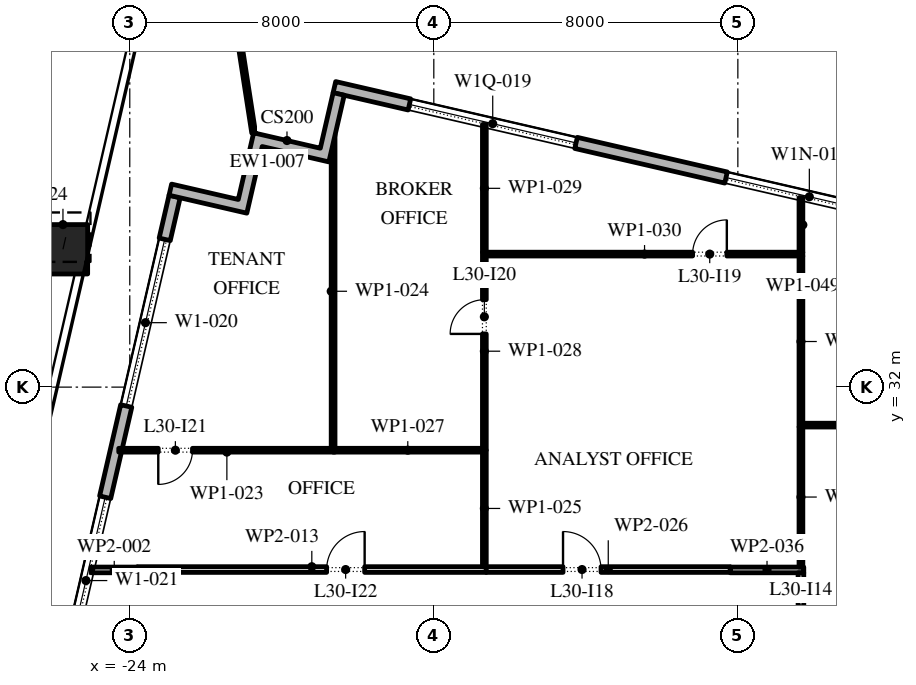
"""IFC4 building model, lengths in metres.
Left out: names, types, materials, properties, quantities, classifications, styles, units other than length and angle.
Written with IfcOpenShell. Run it as: python <this file> out.ifc"""

import sys

from ifc_helpers import new_model, si_unit, direction, frame, frame_2d, origin, origin_2d, place, context, subcontext, project, spatial, polyline, rectangle, outline, extrude, element, fill, save


model = new_model("IFC4")
c1 = context("Model", 3, precision=1e-05, world=origin(), true_north=direction((0.0, 1.0)))
c2 = subcontext(c1, "Body", "Model", "MODEL_VIEW")
j1 = project(units=[si_unit("LENGTHUNIT", "METRE"), si_unit("PLANEANGLEUNIT", "RADIAN")], contexts=[c1])
p1 = place(None, origin())
s1 = spatial("IfcSite", under=j1, at=p1, CompositionType="ELEMENT")
p2 = place(p1, origin())
s2 = spatial("IfcBuilding", under=s1, at=p2, CompositionType="ELEMENT")
p3 = place(p2, frame((0.0, 0.0, 139.2)))
s3 = spatial("IfcBuildingStorey", under=s2, at=p3, CompositionType="ELEMENT", Elevation=139.2)
p4 = place(p3, frame((-25.758, 35.626, 0.0), z_axis=(0.017444089556, 0.075687644385, 0.996978978829), x_axis=(-0.974454034257, 0.224587032398, 0.0)))
e1 = element("IfcColumn", 1, at=p4, inside=s3, PredefinedType="COLUMN", context=c2, shape_type="SweptSolid", body=[
    extrude(rectangle(XDim=1.3, YDim=1.3, at=origin_2d()), origin(), (0.0, 0.0, 1.0), 4.213),
])
p5 = place(p3, frame((31.078, 28.421, 0.0), z_axis=(0.0, 0.0, 1.0), x_axis=(-0.974370456532, 0.224949357493, 0.0)))
e2 = element("IfcWall", 2, at=p5, inside=s3, PredefinedType="STANDARD", context=c2, shape_type="SweptSolid", body=[
    extrude(rectangle(XDim=51.0, YDim=0.3, at=frame_2d((25.5, 0.0))), origin(), (0.0, 0.0, 1.0), 4.0),
])
p6 = place(p5, frame((1.875, 0.0, 0.45)))
e3 = element("IfcOpeningElement", 3, at=p6, cuts=e2, PredefinedType="OPENING", context=c2, shape_type="SweptSolid", body=[
    extrude(rectangle(XDim=4.5, YDim=2.875, at=frame_2d((2.25, 1.438))), frame((0.0, 0.16, 0.0), z_axis=(0.0, -1.0, 0.0), x_axis=(1.0, 0.0, 0.0)), (0.0, 0.0, 1.0), 0.32),
])
p7 = place(p5, frame((10.275, 0.0, 0.45)))
e4 = element("IfcOpeningElement", 4, at=p7, cuts=e2, PredefinedType="OPENING", context=c2, shape_type="SweptSolid", body=[
    extrude(rectangle(XDim=4.5, YDim=2.825, at=frame_2d((2.25, 1.413))), frame((0.0, 0.16, 0.0), z_axis=(0.0, -1.0, 0.0), x_axis=(1.0, 0.0, 0.0)), (0.0, 0.0, 1.0), 0.32),
])
p8 = place(p5, frame((18.825, 0.0, 0.45)))
e5 = element("IfcOpeningElement", 5, at=p8, cuts=e2, PredefinedType="OPENING", context=c2, shape_type="SweptSolid", body=[
    extrude(rectangle(XDim=4.5, YDim=2.75, at=frame_2d((2.25, 1.375))), frame((0.0, 0.16, 0.0), z_axis=(0.0, -1.0, 0.0), x_axis=(1.0, 0.0, 0.0)), (0.0, 0.0, 1.0), 0.32),
])
p9 = place(p5, frame((27.075, 0.0, 0.0)))
e6 = element("IfcOpeningElement", 6, at=p9, cuts=e2, PredefinedType="OPENING", context=c2, shape_type="SweptSolid", body=[
    extrude(rectangle(XDim=2.4, YDim=3.125, at=frame_2d((1.2, 1.562))), frame((0.0, 0.16, 0.0), z_axis=(0.0, -1.0, 0.0), x_axis=(1.0, 0.0, 0.0)), (0.0, 0.0, 1.0), 0.32),
])
p10 = place(p5, frame((35.925, 0.0, 0.45)))
e7 = element("IfcOpeningElement", 7, at=p10, cuts=e2, PredefinedType="OPENING", context=c2, shape_type="SweptSolid", body=[
    extrude(rectangle(XDim=4.5, YDim=2.525, at=frame_2d((2.25, 1.262))), frame((0.0, 0.16, 0.0), z_axis=(0.0, -1.0, 0.0), x_axis=(1.0, 0.0, 0.0)), (0.0, 0.0, 1.0), 0.32),
])
p11 = place(p5, frame((44.475, 0.0, 0.45)))
e8 = element("IfcOpeningElement", 8, at=p11, cuts=e2, PredefinedType="OPENING", context=c2, shape_type="SweptSolid", body=[
    extrude(rectangle(XDim=4.5, YDim=2.45, at=frame_2d((2.25, 1.225))), frame((0.0, 0.16, 0.0), z_axis=(0.0, -1.0, 0.0), x_axis=(1.0, 0.0, 0.0)), (0.0, 0.0, 1.0), 0.32),
])
p12 = place(p3, frame((-22.82, 37.016, 0.0), z_axis=(0.0, 0.0, 1.0), x_axis=(-0.224953880882, -0.974369412223, 0.0)))
e9 = element("IfcWall", 9, at=p12, inside=s3, PredefinedType="STANDARD", context=c2, shape_type="SweptSolid", body=[
    extrude(rectangle(XDim=49.5, YDim=0.3, at=frame_2d((24.75, 0.0))), origin(), (0.0, 0.0, 1.0), 4.0),
])
p13 = place(p12, frame((1.157, 0.0, 0.45)))
e10 = element("IfcOpeningElement", 10, at=p13, cuts=e9, PredefinedType="OPENING", context=c2, shape_type="SweptSolid", body=[
    extrude(rectangle(XDim=4.5, YDim=3.05, at=frame_2d((2.25, 1.525))), frame((0.0, 0.16, 0.0), z_axis=(0.0, -1.0, 0.0), x_axis=(1.0, 0.0, 0.0)), (0.0, 0.0, 1.0), 0.32),
])
p14 = place(p12, frame((8.121, 0.0, 0.45)))
e11 = element("IfcOpeningElement", 11, at=p14, cuts=e9, PredefinedType="OPENING", context=c2, shape_type="SweptSolid", body=[
    extrude(rectangle(XDim=4.5, YDim=3.05, at=frame_2d((2.25, 1.525))), frame((0.0, 0.16, 0.0), z_axis=(0.0, -1.0, 0.0), x_axis=(1.0, 0.0, 0.0)), (0.0, 0.0, 1.0), 0.32),
])
p15 = place(p12, frame((15.236, 0.0, 0.45)))
e12 = element("IfcOpeningElement", 12, at=p15, cuts=e9, PredefinedType="OPENING", context=c2, shape_type="SweptSolid", body=[
    extrude(rectangle(XDim=4.5, YDim=3.05, at=frame_2d((2.25, 1.525))), frame((0.0, 0.16, 0.0), z_axis=(0.0, -1.0, 0.0), x_axis=(1.0, 0.0, 0.0)), (0.0, 0.0, 1.0), 0.32),
])
p16 = place(p12, frame((23.4, 0.0, 0.0)))
e13 = element("IfcOpeningElement", 13, at=p16, cuts=e9, PredefinedType="OPENING", context=c2, shape_type="SweptSolid", body=[
    extrude(rectangle(XDim=2.4, YDim=3.5, at=frame_2d((1.2, 1.75))), frame((0.0, 0.16, 0.0), z_axis=(0.0, -1.0, 0.0), x_axis=(1.0, 0.0, 0.0)), (0.0, 0.0, 1.0), 0.32),
])
p17 = place(p12, frame((29.464, 0.0, 0.45)))
e14 = element("IfcOpeningElement", 14, at=p17, cuts=e9, PredefinedType="OPENING", context=c2, shape_type="SweptSolid", body=[
    extrude(rectangle(XDim=4.5, YDim=2.875, at=frame_2d((2.25, 1.438))), frame((0.0, 0.16, 0.0), z_axis=(0.0, -1.0, 0.0), x_axis=(1.0, 0.0, 0.0)), (0.0, 0.0, 1.0), 0.32),
])
p18 = place(p12, frame((36.579, 0.0, 0.45)))
e15 = element("IfcOpeningElement", 15, at=p18, cuts=e9, PredefinedType="OPENING", context=c2, shape_type="SweptSolid", body=[
    extrude(rectangle(XDim=4.5, YDim=2.675, at=frame_2d((2.25, 1.337))), frame((0.0, 0.16, 0.0), z_axis=(0.0, -1.0, 0.0), x_axis=(1.0, 0.0, 0.0)), (0.0, 0.0, 1.0), 0.32),
])
p19 = place(p12, frame((43.693, 0.0, 0.45)))
e16 = element("IfcOpeningElement", 16, at=p19, cuts=e9, PredefinedType="OPENING", context=c2, shape_type="SweptSolid", body=[
    extrude(rectangle(XDim=4.5, YDim=3.05, at=frame_2d((2.25, 1.525))), frame((0.0, 0.16, 0.0), z_axis=(0.0, -1.0, 0.0), x_axis=(1.0, 0.0, 0.0)), (0.0, 0.0, 1.0), 0.32),
])
p20 = place(p3, origin())
e17 = element("IfcWall", 17, at=p20, inside=s3, PredefinedType="STANDARD", context=c2, shape_type="SweptSolid", body=[
    extrude(outline(polyline([(-22.967, 37.049), (-22.899, 37.342), (-21.145, 36.937), (-20.74, 38.691), (-18.986, 38.286), (-18.649, 39.747), (-18.357, 39.68), (-18.762, 37.926), (-20.515, 38.331), (-20.92, 36.577), (-22.967, 37.049)])), origin(), (0.0, 0.0, 1.0), 4.0),
])
p21 = place(p3, frame((-20.74, 38.691, -0.05), z_axis=(0.0, 0.0, 1.0), x_axis=(-0.153017511603, 0.988223477328, 0.0)))
e18 = element("IfcWall", 18, at=p21, inside=s3, PredefinedType="STANDARD", context=c2, shape_type="SweptSolid", body=[
    extrude(rectangle(XDim=4.871, YDim=0.1, at=frame_2d((2.436, 0.0))), origin(), (0.0, 0.0, 1.0), 4.05),
])
p22 = place(p3, frame((-25.017, 27.19, 0.0), z_axis=(0.0, 0.0, 1.0), x_axis=(1.0, 0.0, 0.0)))
e19 = element("IfcWall", 19, at=p22, inside=s3, PredefinedType="PARTITIONING", context=c2, shape_type="SweptSolid", body=[
    extrude(rectangle(XDim=1.217, YDim=0.15, at=frame_2d((0.608, 0.0))), origin(), (0.0, 0.0, 1.0), 4.0),
])
p23 = place(p3, frame((-23.8, 27.2, 0.0), z_axis=(0.0, 0.0, 1.0), x_axis=(1.0, 0.0, 0.0)))
e20 = element("IfcWall", 20, at=p23, inside=s3, PredefinedType="PARTITIONING", context=c2, shape_type="SweptSolid", body=[
    extrude(rectangle(XDim=9.18, YDim=0.15, at=frame_2d((4.59, 0.0))), origin(), (0.0, 0.0, 1.0), 4.0),
])
p24 = place(p23, frame((4.98, 0.0, 0.0)))
e21 = element("IfcOpeningElement", 21, at=p24, cuts=e20, PredefinedType="OPENING", context=c2, shape_type="SweptSolid", body=[
    extrude(rectangle(XDim=1.0, YDim=2.1, at=frame_2d((0.5, 1.05))), frame((0.0, 0.085, 0.0), z_axis=(0.0, -1.0, 0.0), x_axis=(1.0, 0.0, 0.0)), (0.0, 0.0, 1.0), 0.17),
])
p25 = place(p3, frame((-18.6, 30.34, 0.0), z_axis=(0.0, 0.0, 1.0), x_axis=(-1.0, 0.0, 0.0)))
e22 = element("IfcWall", 22, at=p25, inside=s3, PredefinedType="PARTITIONING", context=c2, shape_type="SweptSolid", body=[
    extrude(rectangle(XDim=5.69, YDim=0.1, at=frame_2d((2.845, 0.0))), origin(), (0.0, 0.0, 1.0), 4.0),
])
p26 = place(p25, frame((3.75, 0.0, 0.0)))
e23 = element("IfcOpeningElement", 23, at=p26, cuts=e22, PredefinedType="OPENING", context=c2, shape_type="SweptSolid", body=[
    extrude(rectangle(XDim=0.9, YDim=2.1, at=frame_2d((0.45, 1.05))), frame((0.0, 0.06, 0.0), z_axis=(0.0, -1.0, 0.0), x_axis=(1.0, 0.0, 0.0)), (0.0, 0.0, 1.0), 0.12),
])
p27 = place(p3, frame((-18.65, 30.39, 0.0), z_axis=(0.0, 0.0, 1.0), x_axis=(0.0, 1.0, 0.0)))
e24 = element("IfcWall", 24, at=p27, inside=s3, PredefinedType="PARTITIONING", context=c2, shape_type="SweptSolid", body=[
    extrude(rectangle(XDim=8.264, YDim=0.1, at=frame_2d((4.132, 0.0))), origin(), (0.0, 0.0, 1.0), 4.0),
])
p28 = place(p3, frame((-14.67, 27.275, 0.0), z_axis=(0.0, 0.0, 1.0), x_axis=(0.0, 1.0, 0.0)))
e25 = element("IfcWall", 25, at=p28, inside=s3, PredefinedType="PARTITIONING", context=c2, shape_type="SweptSolid", body=[
    extrude(rectangle(XDim=3.065, YDim=0.1, at=frame_2d((1.533, 0.0))), origin(), (0.0, 0.0, 1.0), 4.0),
])
p29 = place(p3, frame((-14.62, 27.2, 0.0), z_axis=(0.0, 0.0, 1.0), x_axis=(1.0, 0.0, 0.0)))
e26 = element("IfcWall", 26, at=p29, inside=s3, PredefinedType="PARTITIONING", context=c2, shape_type="SweptSolid", body=[
    extrude(rectangle(XDim=6.42, YDim=0.15, at=frame_2d((3.21, 0.0))), origin(), (0.0, 0.0, 1.0), 4.0),
])
p30 = place(p29, frame((2.02, 0.0, 0.0)))
e27 = element("IfcOpeningElement", 27, at=p30, cuts=e26, PredefinedType="OPENING", context=c2, shape_type="SweptSolid", body=[
    extrude(rectangle(XDim=1.0, YDim=2.1, at=frame_2d((0.5, 1.05))), frame((0.0, 0.085, 0.0), z_axis=(0.0, -1.0, 0.0), x_axis=(1.0, 0.0, 0.0)), (0.0, 0.0, 1.0), 0.17),
])
p31 = place(p3, frame((-14.72, 30.34, 0.0), z_axis=(0.0, 0.0, 1.0), x_axis=(-1.0, 0.0, 0.0)))
e28 = element("IfcWall", 28, at=p31, inside=s3, PredefinedType="PARTITIONING", context=c2, shape_type="SweptSolid", body=[
    extrude(rectangle(XDim=3.93, YDim=0.1, at=frame_2d((1.965, 0.0))), origin(), (0.0, 0.0, 1.0), 4.0),
])
p32 = place(p3, frame((-14.67, 30.34, 0.0), z_axis=(0.0, 0.0, 1.0), x_axis=(0.0, 1.0, 0.0)))
e29 = element("IfcWall", 29, at=p32, inside=s3, PredefinedType="PARTITIONING", context=c2, shape_type="SweptSolid", body=[
    extrude(rectangle(XDim=5.21, YDim=0.1, at=frame_2d((2.605, 0.0))), origin(), (0.0, 0.0, 1.0), 4.0),
])
p33 = place(p32, frame((3.06, 0.0, 0.0)))
e30 = element("IfcOpeningElement", 30, at=p33, cuts=e29, PredefinedType="OPENING", context=c2, shape_type="SweptSolid", body=[
    extrude(rectangle(XDim=0.9, YDim=2.1, at=frame_2d((0.45, 1.05))), frame((0.0, 0.06, 0.0), z_axis=(0.0, -1.0, 0.0), x_axis=(1.0, 0.0, 0.0)), (0.0, 0.0, 1.0), 0.12),
])
p34 = place(p3, frame((-14.67, 35.55, 0.0), z_axis=(0.0, 0.0, 1.0), x_axis=(0.0, 1.0, 0.0)))
e31 = element("IfcWall", 31, at=p34, inside=s3, PredefinedType="PARTITIONING", context=c2, shape_type="SweptSolid", body=[
    extrude(rectangle(XDim=3.361, YDim=0.1, at=frame_2d((1.68, 0.0))), origin(), (0.0, 0.0, 1.0), 4.0),
])
p35 = place(p3, frame((-14.62, 35.5, 0.0), z_axis=(0.0, 0.0, 1.0), x_axis=(1.0, 0.0, 0.0)))
e32 = element("IfcWall", 32, at=p35, inside=s3, PredefinedType="PARTITIONING", context=c2, shape_type="SweptSolid", body=[
    extrude(rectangle(XDim=8.33, YDim=0.1, at=frame_2d((4.165, 0.0))), origin(), (0.0, 0.0, 1.0), 4.0),
])
p36 = place(p35, frame((5.43, 0.0, 0.0)))
e33 = element("IfcOpeningElement", 33, at=p36, cuts=e32, PredefinedType="OPENING", context=c2, shape_type="SweptSolid", body=[
    extrude(rectangle(XDim=0.9, YDim=2.1, at=frame_2d((0.45, 1.05))), frame((0.0, 0.06, 0.0), z_axis=(0.0, -1.0, 0.0), x_axis=(1.0, 0.0, 0.0)), (0.0, 0.0, 1.0), 0.12),
])
p37 = place(p3, frame((-8.2, 27.19, 0.0), z_axis=(0.0, 0.0, 1.0), x_axis=(1.0, 0.0, 0.0)))
e34 = element("IfcWall", 34, at=p37, inside=s3, PredefinedType="PARTITIONING", context=c2, shape_type="SweptSolid", body=[
    extrude(rectangle(XDim=1.935, YDim=0.15, at=frame_2d((0.968, 0.0))), origin(), (0.0, 0.0, 1.0), 4.0),
])
p38 = place(p3, frame((-6.34, 27.115, 0.0), z_axis=(0.0, 0.0, 1.0), x_axis=(0.0, -1.0, 0.0)))
e35 = element("IfcWall", 35, at=p38, inside=s3, PredefinedType="PARTITIONING", context=c2, shape_type="SweptSolid", body=[
    extrude(rectangle(XDim=3.655, YDim=0.15, at=frame_2d((1.828, 0.0))), origin(), (0.0, 0.0, 1.0), 4.0),
])
p39 = place(p38, frame((1.055, 0.0, 0.0)))
e36 = element("IfcOpeningElement", 36, at=p39, cuts=e35, PredefinedType="OPENING", context=c2, shape_type="SweptSolid", body=[
    extrude(rectangle(XDim=1.0, YDim=2.1, at=frame_2d((0.5, 1.05))), frame((0.0, 0.085, 0.0), z_axis=(0.0, -1.0, 0.0), x_axis=(1.0, 0.0, 0.0)), (0.0, 0.0, 1.0), 0.17),
])
p40 = place(p3, frame((-6.34, 27.265, 0.0), z_axis=(0.0, 0.0, 1.0), x_axis=(0.0, 1.0, 0.0)))
e37 = element("IfcWall", 37, at=p40, inside=s3, PredefinedType="PARTITIONING", context=c2, shape_type="SweptSolid", body=[
    extrude(rectangle(XDim=3.685, YDim=0.1, at=frame_2d((1.843, 0.0))), origin(), (0.0, 0.0, 1.0), 4.0),
])
p41 = place(p3, frame((-6.34, 30.95, 0.0), z_axis=(0.0, 0.0, 1.0), x_axis=(0.0, 1.0, 0.0)))
e38 = element("IfcWall", 38, at=p41, inside=s3, PredefinedType="PARTITIONING", context=c2, shape_type="SweptSolid", body=[
    extrude(rectangle(XDim=4.5, YDim=0.1, at=frame_2d((2.25, 0.0))), origin(), (0.0, 0.0, 1.0), 4.0),
])
p42 = place(p3, frame((-6.34, 35.55, 0.0), z_axis=(0.0, 0.0, 1.0), x_axis=(0.0, 1.0, 0.0)))
e39 = element("IfcWall", 39, at=p42, inside=s3, PredefinedType="PARTITIONING", context=c2, shape_type="SweptSolid", body=[
    extrude(rectangle(XDim=1.438, YDim=0.1, at=frame_2d((0.719, 0.0))), origin(), (0.0, 0.0, 1.0), 4.0),
])
p43 = place(p3, frame((2.04, 31.0, 0.0), z_axis=(0.0, 0.0, 1.0), x_axis=(-1.0, 0.0, 0.0)))
e40 = element("IfcWall", 40, at=p43, inside=s3, PredefinedType="PARTITIONING", context=c2, shape_type="SweptSolid", body=[
    extrude(rectangle(XDim=8.33, YDim=0.1, at=frame_2d((4.165, 0.0))), origin(), (0.0, 0.0, 1.0), 4.0),
])
p44 = place(p43, frame((2.0, 0.0, 0.0)))
e41 = element("IfcOpeningElement", 41, at=p44, cuts=e40, PredefinedType="OPENING", context=c2, shape_type="SweptSolid", body=[
    extrude(rectangle(XDim=0.9, YDim=2.1, at=frame_2d((0.45, 1.05))), frame((0.0, 0.06, 0.0), z_axis=(0.0, -1.0, 0.0), x_axis=(1.0, 0.0, 0.0)), (0.0, 0.0, 1.0), 0.12),
])
p45 = place(p10, origin())
e42 = element("IfcWindow", 42, at=p45, inside=s3, PartitioningType="DOUBLE_PANEL_VERTICAL", PredefinedType="WINDOW", context=c2, shape_type="SweptSolid", body=[
    extrude(rectangle(XDim=4.5, YDim=2.525, at=frame_2d((2.25, 1.262))), frame((0.0, 0.03, 0.0), z_axis=(0.0, -1.0, 0.0), x_axis=(1.0, 0.0, 0.0)), (0.0, 0.0, 1.0), 0.06),
])
fill(e7, e42)
p46 = place(p11, origin())
e43 = element("IfcWindow", 43, at=p46, inside=s3, PartitioningType="DOUBLE_PANEL_VERTICAL", PredefinedType="WINDOW", context=c2, shape_type="SweptSolid", body=[
    extrude(rectangle(XDim=4.5, YDim=2.45, at=frame_2d((2.25, 1.225))), frame((0.0, 0.03, 0.0), z_axis=(0.0, -1.0, 0.0), x_axis=(1.0, 0.0, 0.0)), (0.0, 0.0, 1.0), 0.06),
])
fill(e8, e43)
p47 = place(p13, origin())
e44 = element("IfcWindow", 44, at=p47, inside=s3, PartitioningType="DOUBLE_PANEL_VERTICAL", PredefinedType="WINDOW", context=c2, shape_type="SweptSolid", body=[
    extrude(rectangle(XDim=4.5, YDim=3.05, at=frame_2d((2.25, 1.525))), frame((0.0, 0.03, 0.0), z_axis=(0.0, -1.0, 0.0), x_axis=(1.0, 0.0, 0.0)), (0.0, 0.0, 1.0), 0.06),
])
fill(e10, e44)
p48 = place(p14, origin())
e45 = element("IfcWindow", 45, at=p48, inside=s3, PartitioningType="DOUBLE_PANEL_VERTICAL", PredefinedType="WINDOW", context=c2, shape_type="SweptSolid", body=[
    extrude(rectangle(XDim=4.5, YDim=3.05, at=frame_2d((2.25, 1.525))), frame((0.0, 0.03, 0.0), z_axis=(0.0, -1.0, 0.0), x_axis=(1.0, 0.0, 0.0)), (0.0, 0.0, 1.0), 0.06),
])
fill(e11, e45)
p49 = place(p30, origin())
e46 = element("IfcDoor", 46, at=p49, inside=s3, OperationType="SINGLE_SWING_RIGHT", PredefinedType="DOOR", context=c2, shape_type="SweptSolid", body=[
    extrude(rectangle(XDim=1.0, YDim=2.1, at=frame_2d((0.5, 1.05))), frame((0.0, 0.025, 0.0), z_axis=(0.0, -1.0, 0.0), x_axis=(1.0, 0.0, 0.0)), (0.0, 0.0, 1.0), 0.05),
])
fill(e27, e46)
p50 = place(p36, origin())
e47 = element("IfcDoor", 47, at=p50, inside=s3, OperationType="SINGLE_SWING_LEFT", PredefinedType="DOOR", context=c2, shape_type="SweptSolid", body=[
    extrude(rectangle(XDim=0.9, YDim=2.1, at=frame_2d((0.45, 1.05))), frame((0.0, 0.025, 0.0), z_axis=(0.0, -1.0, 0.0), x_axis=(1.0, 0.0, 0.0)), (0.0, 0.0, 1.0), 0.05),
])
fill(e33, e47)
p51 = place(p33, origin())
e48 = element("IfcDoor", 48, at=p51, inside=s3, OperationType="SINGLE_SWING_RIGHT", PredefinedType="DOOR", context=c2, shape_type="SweptSolid", body=[
    extrude(rectangle(XDim=0.9, YDim=2.1, at=frame_2d((0.45, 1.05))), frame((0.0, 0.025, 0.0), z_axis=(0.0, -1.0, 0.0), x_axis=(1.0, 0.0, 0.0)), (0.0, 0.0, 1.0), 0.05),
])
fill(e30, e48)
p52 = place(p26, origin())
e49 = element("IfcDoor", 49, at=p52, inside=s3, OperationType="SINGLE_SWING_LEFT", PredefinedType="DOOR", context=c2, shape_type="SweptSolid", body=[
    extrude(rectangle(XDim=0.9, YDim=2.1, at=frame_2d((0.45, 1.05))), frame((0.0, 0.025, 0.0), z_axis=(0.0, -1.0, 0.0), x_axis=(1.0, 0.0, 0.0)), (0.0, 0.0, 1.0), 0.05),
])
fill(e23, e49)
p53 = place(p24, origin())
e50 = element("IfcDoor", 50, at=p53, inside=s3, OperationType="SINGLE_SWING_LEFT", PredefinedType="DOOR", context=c2, shape_type="SweptSolid", body=[
    extrude(rectangle(XDim=1.0, YDim=2.1, at=frame_2d((0.5, 1.05))), frame((0.0, 0.025, 0.0), z_axis=(0.0, -1.0, 0.0), x_axis=(1.0, 0.0, 0.0)), (0.0, 0.0, 1.0), 0.05),
])
fill(e21, e50)
save(model, sys.argv[1])
